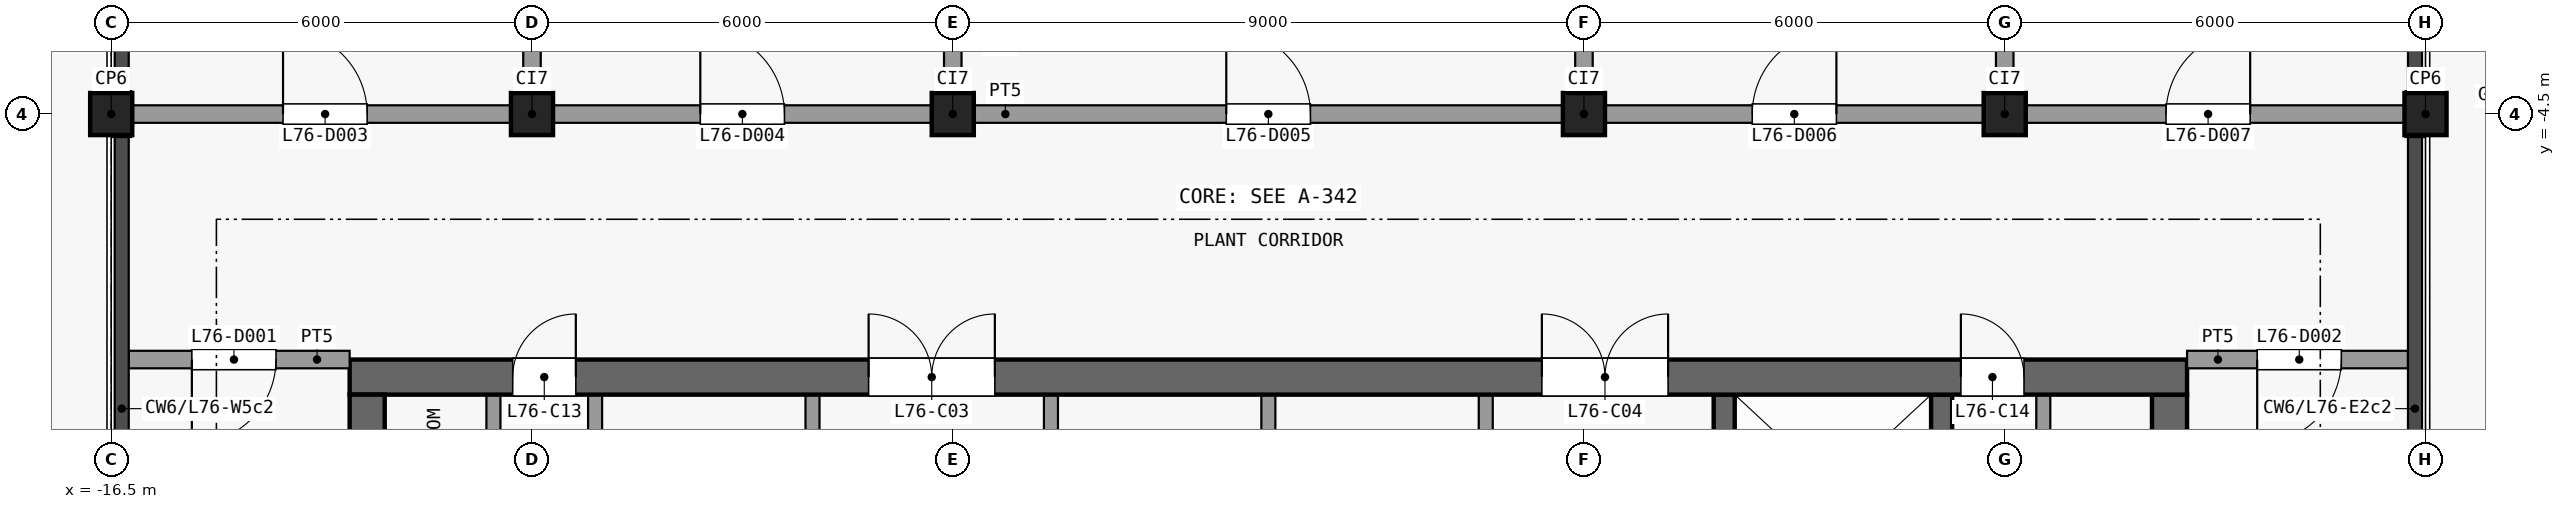
"""IFC4 building model, lengths in metres.
Left out: names, types, materials, properties, quantities, classifications, styles, units other than length and angle.
Written with IfcOpenShell. Run it as: python <this file> out.ifc"""

import sys

from ifc_helpers import new_model, si_unit, direction, frame, frame_2d, origin, origin_2d, place, context, subcontext, project, spatial, rectangle, extrude, element, fill, save


model = new_model("IFC4")
c1 = context("Model", 3, precision=1e-05, world=origin(), true_north=direction((0.0, 1.0)))
c2 = subcontext(c1, "Body", "Model", "MODEL_VIEW")
j1 = project(units=[si_unit("LENGTHUNIT", "METRE"), si_unit("PLANEANGLEUNIT", "RADIAN")], contexts=[c1])
p1 = place(None, origin())
s1 = spatial("IfcSite", under=j1, at=p1, CompositionType="ELEMENT")
p2 = place(p1, origin())
s2 = spatial("IfcBuilding", under=s1, at=p2, CompositionType="ELEMENT")
p3 = place(p2, frame((0.0, 0.0, 298.7)))
s3 = spatial("IfcBuildingStorey", under=s2, at=p3, CompositionType="ELEMENT", Elevation=298.7)
for number, where, z_axis, x_axis in (
    (1, (-16.5, -4.5, 0.0), (0.0, 0.0, 1.0), (1.0, 0.0, 0.0)),
    (2, (-10.5, -4.5, 0.0), (0.0, 0.0, 1.0), (1.0, 0.0, 0.0)),
    (3, (-4.5, -4.5, 0.0), (0.0, 0.0, 1.0), (1.0, 0.0, 0.0)),
    (4, (4.5, -4.5, 0.0), (0.0, 0.0, 1.0), (1.0, 0.0, 0.0)),
    (5, (10.5, -4.5, 0.0), (0.0, 0.0, 1.0), (1.0, 0.0, 0.0)),
    (6, (16.5, -4.5, 0.0), (0.0, 0.0, 1.0), (1.0, 0.0, 0.0)),
):
    element("IfcColumn", number, at=place(p3, frame(where, z_axis=z_axis, x_axis=x_axis)), inside=s3, PredefinedType="COLUMN", context=c2, shape_type="SweptSolid", body=[
        extrude(rectangle(XDim=0.6, YDim=0.6, at=origin_2d()), origin(), (0.0, 0.0, 1.0), 4.5),
    ])
p4 = place(p3, frame((-13.1, -8.25, 0.0), z_axis=(0.0, 0.0, 1.0), x_axis=(1.0, 0.0, 0.0)))
e7 = element("IfcWall", 7, at=p4, inside=s3, PredefinedType="SHEAR", context=c2, shape_type="SweptSolid", body=[
    extrude(rectangle(XDim=26.2, YDim=0.5, at=frame_2d((13.1, 0.0))), origin(), (0.0, 0.0, 1.0), 4.2),
])
p5 = place(p4, frame((7.4, 0.0, 0.0)))
e8 = element("IfcOpeningElement", 8, at=p5, cuts=e7, PredefinedType="OPENING", context=c2, shape_type="SweptSolid", body=[
    extrude(rectangle(XDim=1.8, YDim=2.1, at=frame_2d((0.9, 1.05))), frame((0.0, 0.26, 0.0), z_axis=(0.0, -1.0, 0.0), x_axis=(1.0, 0.0, 0.0)), (0.0, 0.0, 1.0), 0.52),
])
p6 = place(p4, frame((17.0, 0.0, 0.0)))
e9 = element("IfcOpeningElement", 9, at=p6, cuts=e7, PredefinedType="OPENING", context=c2, shape_type="SweptSolid", body=[
    extrude(rectangle(XDim=1.8, YDim=2.1, at=frame_2d((0.9, 1.05))), frame((0.0, 0.26, 0.0), z_axis=(0.0, -1.0, 0.0), x_axis=(1.0, 0.0, 0.0)), (0.0, 0.0, 1.0), 0.52),
])
p7 = place(p4, frame((2.325, 0.0, 0.0)))
e10 = element("IfcOpeningElement", 10, at=p7, cuts=e7, PredefinedType="OPENING", context=c2, shape_type="SweptSolid", body=[
    extrude(rectangle(XDim=0.9, YDim=2.1, at=frame_2d((0.45, 1.05))), frame((0.0, 0.26, 0.0), z_axis=(0.0, -1.0, 0.0), x_axis=(1.0, 0.0, 0.0)), (0.0, 0.0, 1.0), 0.52),
])
p8 = place(p4, frame((22.975, 0.0, 0.0)))
e11 = element("IfcOpeningElement", 11, at=p8, cuts=e7, PredefinedType="OPENING", context=c2, shape_type="SweptSolid", body=[
    extrude(rectangle(XDim=0.9, YDim=2.1, at=frame_2d((0.45, 1.05))), frame((0.0, 0.26, 0.0), z_axis=(0.0, -1.0, 0.0), x_axis=(1.0, 0.0, 0.0)), (0.0, 0.0, 1.0), 0.52),
])
for number, where, z_axis, x_axis in (
    (12, (-12.85, -24.6, 0.0), (0.0, 0.0, 1.0), (0.0, 1.0, 0.0)),
    (13, (12.85, -24.6, 0.0), (0.0, 0.0, 1.0), (0.0, 1.0, 0.0)),
):
    element("IfcWall", number, at=place(p3, frame(where, z_axis=z_axis, x_axis=x_axis)), inside=s3, PredefinedType="SHEAR", context=c2, shape_type="SweptSolid", body=[
        extrude(rectangle(XDim=16.1, YDim=0.5, at=frame_2d((8.05, 0.0))), origin(), (0.0, 0.0, 1.0), 4.2),
    ])
p9 = place(p3, frame((-11.05, -11.4, 0.0), z_axis=(0.0, 0.0, 1.0), x_axis=(0.0, 1.0, 0.0)))
e14 = element("IfcWall", 14, at=p9, inside=s3, PredefinedType="PARTITIONING", context=c2, shape_type="SweptSolid", body=[
    extrude(rectangle(XDim=2.9, YDim=0.2, at=frame_2d((1.45, 0.0))), origin(), (0.0, 0.0, 1.0), 4.2),
])
p10 = place(p9, frame((1.05, 0.0, 0.0)))
e15 = element("IfcOpeningElement", 15, at=p10, cuts=e14, PredefinedType="OPENING", context=c2, shape_type="SweptSolid", body=[
    extrude(rectangle(XDim=0.9, YDim=2.1, at=frame_2d((0.45, 1.05))), frame((0.0, 0.11, 0.0), z_axis=(0.0, -1.0, 0.0), x_axis=(1.0, 0.0, 0.0)), (0.0, 0.0, 1.0), 0.22),
])
p11 = place(p3, frame((-9.6, -16.9, 0.0), z_axis=(0.0, 0.0, 1.0), x_axis=(0.0, 1.0, 0.0)))
e16 = element("IfcWall", 16, at=p11, inside=s3, PredefinedType="PARTITIONING", context=c2, shape_type="SweptSolid", body=[
    extrude(rectangle(XDim=8.4, YDim=0.2, at=frame_2d((4.2, 0.0))), origin(), (0.0, 0.0, 1.0), 4.2),
])
p12 = place(p3, frame((-6.5, -22.5, 0.0), z_axis=(0.0, 0.0, 1.0), x_axis=(0.0, 1.0, 0.0)))
e17 = element("IfcWall", 17, at=p12, inside=s3, PredefinedType="PARTITIONING", context=c2, shape_type="SweptSolid", body=[
    extrude(rectangle(XDim=14.0, YDim=0.2, at=frame_2d((7.0, 0.0))), origin(), (0.0, 0.0, 1.0), 4.2),
])
p13 = place(p12, frame((6.45, 0.0, 0.0)))
e18 = element("IfcOpeningElement", 18, at=p13, cuts=e17, PredefinedType="OPENING", context=c2, shape_type="SweptSolid", body=[
    extrude(rectangle(XDim=1.2, YDim=2.1, at=frame_2d((0.6, 1.05))), frame((0.0, 0.11, 0.0), z_axis=(0.0, -1.0, 0.0), x_axis=(1.0, 0.0, 0.0)), (0.0, 0.0, 1.0), 0.22),
])
p14 = place(p3, frame((-3.1, -8.5, 0.0), z_axis=(0.0, 0.0, 1.0), x_axis=(0.0, -1.0, 0.0)))
e19 = element("IfcWall", 19, at=p14, inside=s3, PredefinedType="PARTITIONING", context=c2, shape_type="SweptSolid", body=[
    extrude(rectangle(XDim=10.97, YDim=0.2, at=frame_2d((5.485, 0.0))), origin(), (0.0, 0.0, 1.0), 4.2),
])
p15 = place(p14, frame((7.74, 0.0, 0.0)))
e20 = element("IfcOpeningElement", 20, at=p15, cuts=e19, PredefinedType="OPENING", context=c2, shape_type="SweptSolid", body=[
    extrude(rectangle(XDim=1.2, YDim=2.1, at=frame_2d((0.6, 1.05))), frame((0.0, 0.11, 0.0), z_axis=(0.0, -1.0, 0.0), x_axis=(1.0, 0.0, 0.0)), (0.0, 0.0, 1.0), 0.22),
])
p16 = place(p14, frame((2.18, 0.0, 0.0)))
e21 = element("IfcOpeningElement", 21, at=p16, cuts=e19, PredefinedType="OPENING", context=c2, shape_type="SweptSolid", body=[
    extrude(rectangle(XDim=1.2, YDim=2.1, at=frame_2d((0.6, 1.05))), frame((0.0, 0.11, 0.0), z_axis=(0.0, -1.0, 0.0), x_axis=(1.0, 0.0, 0.0)), (0.0, 0.0, 1.0), 0.22),
])
p17 = place(p3, frame((0.0, -19.35, 0.0), z_axis=(0.0, 0.0, 1.0), x_axis=(0.0, 1.0, 0.0)))
e22 = element("IfcWall", 22, at=p17, inside=s3, PredefinedType="PARTITIONING", context=c2, shape_type="SweptSolid", body=[
    extrude(rectangle(XDim=10.85, YDim=0.2, at=frame_2d((5.425, 0.0))), origin(), (0.0, 0.0, 1.0), 4.2),
])
p18 = place(p3, frame((3.1, -19.6, 0.0), z_axis=(0.0, 0.0, 1.0), x_axis=(0.0, 1.0, 0.0)))
e23 = element("IfcWall", 23, at=p18, inside=s3, PredefinedType="PARTITIONING", context=c2, shape_type="SweptSolid", body=[
    extrude(rectangle(XDim=11.1, YDim=0.2, at=frame_2d((5.55, 0.0))), origin(), (0.0, 0.0, 1.0), 4.2),
])
p19 = place(p18, frame((2.25, 0.0, 0.0)))
e24 = element("IfcOpeningElement", 24, at=p19, cuts=e23, PredefinedType="OPENING", context=c2, shape_type="SweptSolid", body=[
    extrude(rectangle(XDim=1.2, YDim=2.1, at=frame_2d((0.6, 1.05))), frame((0.0, 0.11, 0.0), z_axis=(0.0, -1.0, 0.0), x_axis=(1.0, 0.0, 0.0)), (0.0, 0.0, 1.0), 0.22),
])
p20 = place(p18, frame((7.75, 0.0, 0.0)))
e25 = element("IfcOpeningElement", 25, at=p20, cuts=e23, PredefinedType="OPENING", context=c2, shape_type="SweptSolid", body=[
    extrude(rectangle(XDim=1.2, YDim=2.1, at=frame_2d((0.6, 1.05))), frame((0.0, 0.11, 0.0), z_axis=(0.0, -1.0, 0.0), x_axis=(1.0, 0.0, 0.0)), (0.0, 0.0, 1.0), 0.22),
])
p21 = place(p3, frame((6.5, -22.55, 0.0), z_axis=(0.0, 0.0, 1.0), x_axis=(0.0, 1.0, 0.0)))
e26 = element("IfcWall", 26, at=p21, inside=s3, PredefinedType="SHEAR", context=c2, shape_type="SweptSolid", body=[
    extrude(rectangle(XDim=14.05, YDim=0.3, at=frame_2d((7.025, 0.0))), origin(), (0.0, 0.0, 1.0), 4.2),
])
p22 = place(p21, frame((1.05, 0.0, 0.0)))
e27 = element("IfcOpeningElement", 27, at=p22, cuts=e26, PredefinedType="OPENING", context=c2, shape_type="SweptSolid", body=[
    extrude(rectangle(XDim=1.1, YDim=2.1, at=frame_2d((0.55, 1.05))), frame((0.0, 0.16, 0.0), z_axis=(0.0, -1.0, 0.0), x_axis=(1.0, 0.0, 0.0)), (0.0, 0.0, 1.0), 0.32),
])
p23 = place(p3, frame((9.6, -17.2, 0.0), z_axis=(0.0, 0.0, 1.0), x_axis=(0.0, 1.0, 0.0)))
e28 = element("IfcWall", 28, at=p23, inside=s3, PredefinedType="SHEAR", context=c2, shape_type="SweptSolid", body=[
    extrude(rectangle(XDim=8.7, YDim=0.3, at=frame_2d((4.35, 0.0))), origin(), (0.0, 0.0, 1.0), 4.2),
])
p24 = place(p3, frame((11.05, -8.5, 0.0), z_axis=(0.0, 0.0, 1.0), x_axis=(0.0, -1.0, 0.0)))
e29 = element("IfcWall", 29, at=p24, inside=s3, PredefinedType="PARTITIONING", context=c2, shape_type="SweptSolid", body=[
    extrude(rectangle(XDim=4.9, YDim=0.2, at=frame_2d((2.45, 0.0))), origin(), (0.0, 0.0, 1.0), 4.2),
])
p25 = place(p24, frame((1.95, 0.0, 0.0)))
e30 = element("IfcOpeningElement", 30, at=p25, cuts=e29, PredefinedType="OPENING", context=c2, shape_type="SweptSolid", body=[
    extrude(rectangle(XDim=0.9, YDim=2.1, at=frame_2d((0.45, 1.05))), frame((0.0, 0.11, 0.0), z_axis=(0.0, -1.0, 0.0), x_axis=(1.0, 0.0, 0.0)), (0.0, 0.0, 1.0), 0.22),
])
p26 = place(p3, frame((-16.25, -8.0, 0.0), z_axis=(0.0, 0.0, 1.0), x_axis=(1.0, 0.0, 0.0)))
e31 = element("IfcWall", 31, at=p26, inside=s3, PredefinedType="PARTITIONING", context=c2, shape_type="SweptSolid", body=[
    extrude(rectangle(XDim=3.15, YDim=0.25, at=frame_2d((1.575, 0.0))), origin(), (0.0, 0.0, 1.0), 4.2),
])
p27 = place(p26, frame((0.9, 0.0, 0.0)))
e32 = element("IfcOpeningElement", 32, at=p27, cuts=e31, PredefinedType="OPENING", context=c2, shape_type="SweptSolid", body=[
    extrude(rectangle(XDim=1.2, YDim=2.1, at=frame_2d((0.6, 1.05))), frame((0.0, 0.135, 0.0), z_axis=(0.0, -1.0, 0.0), x_axis=(1.0, 0.0, 0.0)), (0.0, 0.0, 1.0), 0.27),
])
p28 = place(p3, frame((13.1, -8.0, 0.0), z_axis=(0.0, 0.0, 1.0), x_axis=(1.0, 0.0, 0.0)))
e33 = element("IfcWall", 33, at=p28, inside=s3, PredefinedType="PARTITIONING", context=c2, shape_type="SweptSolid", body=[
    extrude(rectangle(XDim=3.15, YDim=0.25, at=frame_2d((1.575, 0.0))), origin(), (0.0, 0.0, 1.0), 4.2),
])
p29 = place(p28, frame((1.0, 0.0, 0.0)))
e34 = element("IfcOpeningElement", 34, at=p29, cuts=e33, PredefinedType="OPENING", context=c2, shape_type="SweptSolid", body=[
    extrude(rectangle(XDim=1.2, YDim=2.1, at=frame_2d((0.6, 1.05))), frame((0.0, 0.135, 0.0), z_axis=(0.0, -1.0, 0.0), x_axis=(1.0, 0.0, 0.0)), (0.0, 0.0, 1.0), 0.27),
])
p30 = place(p3, frame((-16.35, -4.5, 0.0), z_axis=(0.0, 0.0, 1.0), x_axis=(1.0, 0.0, 0.0)))
e35 = element("IfcWall", 35, at=p30, inside=s3, PredefinedType="PARTITIONING", context=c2, shape_type="SweptSolid", body=[
    extrude(rectangle(XDim=32.7, YDim=0.25, at=frame_2d((16.35, 0.0))), origin(), (0.0, 0.0, 1.0), 4.2),
])
p31 = place(p30, frame((2.3, 0.0, 0.0)))
e36 = element("IfcOpeningElement", 36, at=p31, cuts=e35, PredefinedType="OPENING", context=c2, shape_type="SweptSolid", body=[
    extrude(rectangle(XDim=1.2, YDim=2.1, at=frame_2d((0.6, 1.05))), frame((0.0, 0.135, 0.0), z_axis=(0.0, -1.0, 0.0), x_axis=(1.0, 0.0, 0.0)), (0.0, 0.0, 1.0), 0.27),
])
p32 = place(p30, frame((8.25, 0.0, 0.0)))
e37 = element("IfcOpeningElement", 37, at=p32, cuts=e35, PredefinedType="OPENING", context=c2, shape_type="SweptSolid", body=[
    extrude(rectangle(XDim=1.2, YDim=2.1, at=frame_2d((0.6, 1.05))), frame((0.0, 0.135, 0.0), z_axis=(0.0, -1.0, 0.0), x_axis=(1.0, 0.0, 0.0)), (0.0, 0.0, 1.0), 0.27),
])
p33 = place(p30, frame((15.75, 0.0, 0.0)))
e38 = element("IfcOpeningElement", 38, at=p33, cuts=e35, PredefinedType="OPENING", context=c2, shape_type="SweptSolid", body=[
    extrude(rectangle(XDim=1.2, YDim=2.1, at=frame_2d((0.6, 1.05))), frame((0.0, 0.135, 0.0), z_axis=(0.0, -1.0, 0.0), x_axis=(1.0, 0.0, 0.0)), (0.0, 0.0, 1.0), 0.27),
])
p34 = place(p30, frame((23.25, 0.0, 0.0)))
e39 = element("IfcOpeningElement", 39, at=p34, cuts=e35, PredefinedType="OPENING", context=c2, shape_type="SweptSolid", body=[
    extrude(rectangle(XDim=1.2, YDim=2.1, at=frame_2d((0.6, 1.05))), frame((0.0, 0.135, 0.0), z_axis=(0.0, -1.0, 0.0), x_axis=(1.0, 0.0, 0.0)), (0.0, 0.0, 1.0), 0.27),
])
p35 = place(p30, frame((29.15, 0.0, 0.0)))
e40 = element("IfcOpeningElement", 40, at=p35, cuts=e35, PredefinedType="OPENING", context=c2, shape_type="SweptSolid", body=[
    extrude(rectangle(XDim=1.2, YDim=2.1, at=frame_2d((0.6, 1.05))), frame((0.0, 0.135, 0.0), z_axis=(0.0, -1.0, 0.0), x_axis=(1.0, 0.0, 0.0)), (0.0, 0.0, 1.0), 0.27),
])
for number, where, z_axis, x_axis in (
    (41, (-10.5, -4.375, 0.0), (0.0, 0.0, 1.0), (0.0, 1.0, 0.0)),
    (42, (-4.5, -4.375, 0.0), (0.0, 0.0, 1.0), (0.0, 1.0, 0.0)),
    (43, (4.5, -4.375, 0.0), (0.0, 0.0, 1.0), (0.0, 1.0, 0.0)),
    (44, (10.5, -4.375, 0.0), (0.0, 0.0, 1.0), (0.0, 1.0, 0.0)),
):
    element("IfcWall", number, at=place(p3, frame(where, z_axis=z_axis, x_axis=x_axis)), inside=s3, PredefinedType="PARTITIONING", context=c2, shape_type="SweptSolid", body=[
        extrude(rectangle(XDim=17.725, YDim=0.25, at=frame_2d((8.863, 0.0))), origin(), (0.0, 0.0, 1.0), 4.2),
    ])
p36 = place(p5, origin())
e45 = element("IfcDoor", 45, at=p36, inside=s3, OperationType="DOUBLE_DOOR_SINGLE_SWING", PredefinedType="DOOR", context=c2, shape_type="SweptSolid", body=[
    extrude(rectangle(XDim=1.8, YDim=2.1, at=frame_2d((0.9, 1.05))), frame((0.0, 0.025, 0.0), z_axis=(0.0, -1.0, 0.0), x_axis=(1.0, 0.0, 0.0)), (0.0, 0.0, 1.0), 0.05),
])
fill(e8, e45)
p37 = place(p6, origin())
e46 = element("IfcDoor", 46, at=p37, inside=s3, OperationType="DOUBLE_DOOR_SINGLE_SWING", PredefinedType="DOOR", context=c2, shape_type="SweptSolid", body=[
    extrude(rectangle(XDim=1.8, YDim=2.1, at=frame_2d((0.9, 1.05))), frame((0.0, 0.025, 0.0), z_axis=(0.0, -1.0, 0.0), x_axis=(1.0, 0.0, 0.0)), (0.0, 0.0, 1.0), 0.05),
])
fill(e9, e46)
p38 = place(p7, origin())
e47 = element("IfcDoor", 47, at=p38, inside=s3, OperationType="SINGLE_SWING_RIGHT", PredefinedType="DOOR", context=c2, shape_type="SweptSolid", body=[
    extrude(rectangle(XDim=0.9, YDim=2.1, at=frame_2d((0.45, 1.05))), frame((0.0, 0.025, 0.0), z_axis=(0.0, -1.0, 0.0), x_axis=(1.0, 0.0, 0.0)), (0.0, 0.0, 1.0), 0.05),
])
fill(e10, e47)
p39 = place(p8, origin())
e48 = element("IfcDoor", 48, at=p39, inside=s3, OperationType="SINGLE_SWING_LEFT", PredefinedType="DOOR", context=c2, shape_type="SweptSolid", body=[
    extrude(rectangle(XDim=0.9, YDim=2.1, at=frame_2d((0.45, 1.05))), frame((0.0, 0.025, 0.0), z_axis=(0.0, -1.0, 0.0), x_axis=(1.0, 0.0, 0.0)), (0.0, 0.0, 1.0), 0.05),
])
fill(e11, e48)
p40 = place(p27, origin())
e49 = element("IfcDoor", 49, at=p40, inside=s3, OperationType="SINGLE_SWING_LEFT", PredefinedType="DOOR", context=c2, shape_type="SweptSolid", body=[
    extrude(rectangle(XDim=1.2, YDim=2.1, at=frame_2d((0.6, 1.05))), frame((0.0, 0.025, 0.0), z_axis=(0.0, -1.0, 0.0), x_axis=(1.0, 0.0, 0.0)), (0.0, 0.0, 1.0), 0.05),
])
fill(e32, e49)
p41 = place(p29, origin())
e50 = element("IfcDoor", 50, at=p41, inside=s3, OperationType="SINGLE_SWING_LEFT", PredefinedType="DOOR", context=c2, shape_type="SweptSolid", body=[
    extrude(rectangle(XDim=1.2, YDim=2.1, at=frame_2d((0.6, 1.05))), frame((0.0, 0.025, 0.0), z_axis=(0.0, -1.0, 0.0), x_axis=(1.0, 0.0, 0.0)), (0.0, 0.0, 1.0), 0.05),
])
fill(e34, e50)
p42 = place(p31, origin())
e51 = element("IfcDoor", 51, at=p42, inside=s3, OperationType="SINGLE_SWING_RIGHT", PredefinedType="DOOR", context=c2, shape_type="SweptSolid", body=[
    extrude(rectangle(XDim=1.2, YDim=2.1, at=frame_2d((0.6, 1.05))), frame((0.0, 0.025, 0.0), z_axis=(0.0, -1.0, 0.0), x_axis=(1.0, 0.0, 0.0)), (0.0, 0.0, 1.0), 0.05),
])
fill(e36, e51)
p43 = place(p32, origin())
e52 = element("IfcDoor", 52, at=p43, inside=s3, OperationType="SINGLE_SWING_RIGHT", PredefinedType="DOOR", context=c2, shape_type="SweptSolid", body=[
    extrude(rectangle(XDim=1.2, YDim=2.1, at=frame_2d((0.6, 1.05))), frame((0.0, 0.025, 0.0), z_axis=(0.0, -1.0, 0.0), x_axis=(1.0, 0.0, 0.0)), (0.0, 0.0, 1.0), 0.05),
])
fill(e37, e52)
p44 = place(p33, origin())
e53 = element("IfcDoor", 53, at=p44, inside=s3, OperationType="SINGLE_SWING_RIGHT", PredefinedType="DOOR", context=c2, shape_type="SweptSolid", body=[
    extrude(rectangle(XDim=1.2, YDim=2.1, at=frame_2d((0.6, 1.05))), frame((0.0, 0.025, 0.0), z_axis=(0.0, -1.0, 0.0), x_axis=(1.0, 0.0, 0.0)), (0.0, 0.0, 1.0), 0.05),
])
fill(e38, e53)
p45 = place(p34, origin())
e54 = element("IfcDoor", 54, at=p45, inside=s3, OperationType="SINGLE_SWING_LEFT", PredefinedType="DOOR", context=c2, shape_type="SweptSolid", body=[
    extrude(rectangle(XDim=1.2, YDim=2.1, at=frame_2d((0.6, 1.05))), frame((0.0, 0.025, 0.0), z_axis=(0.0, -1.0, 0.0), x_axis=(1.0, 0.0, 0.0)), (0.0, 0.0, 1.0), 0.05),
])
fill(e39, e54)
p46 = place(p35, origin())
e55 = element("IfcDoor", 55, at=p46, inside=s3, OperationType="SINGLE_SWING_LEFT", PredefinedType="DOOR", context=c2, shape_type="SweptSolid", body=[
    extrude(rectangle(XDim=1.2, YDim=2.1, at=frame_2d((0.6, 1.05))), frame((0.0, 0.025, 0.0), z_axis=(0.0, -1.0, 0.0), x_axis=(1.0, 0.0, 0.0)), (0.0, 0.0, 1.0), 0.05),
])
fill(e40, e55)
save(model, sys.argv[1])
